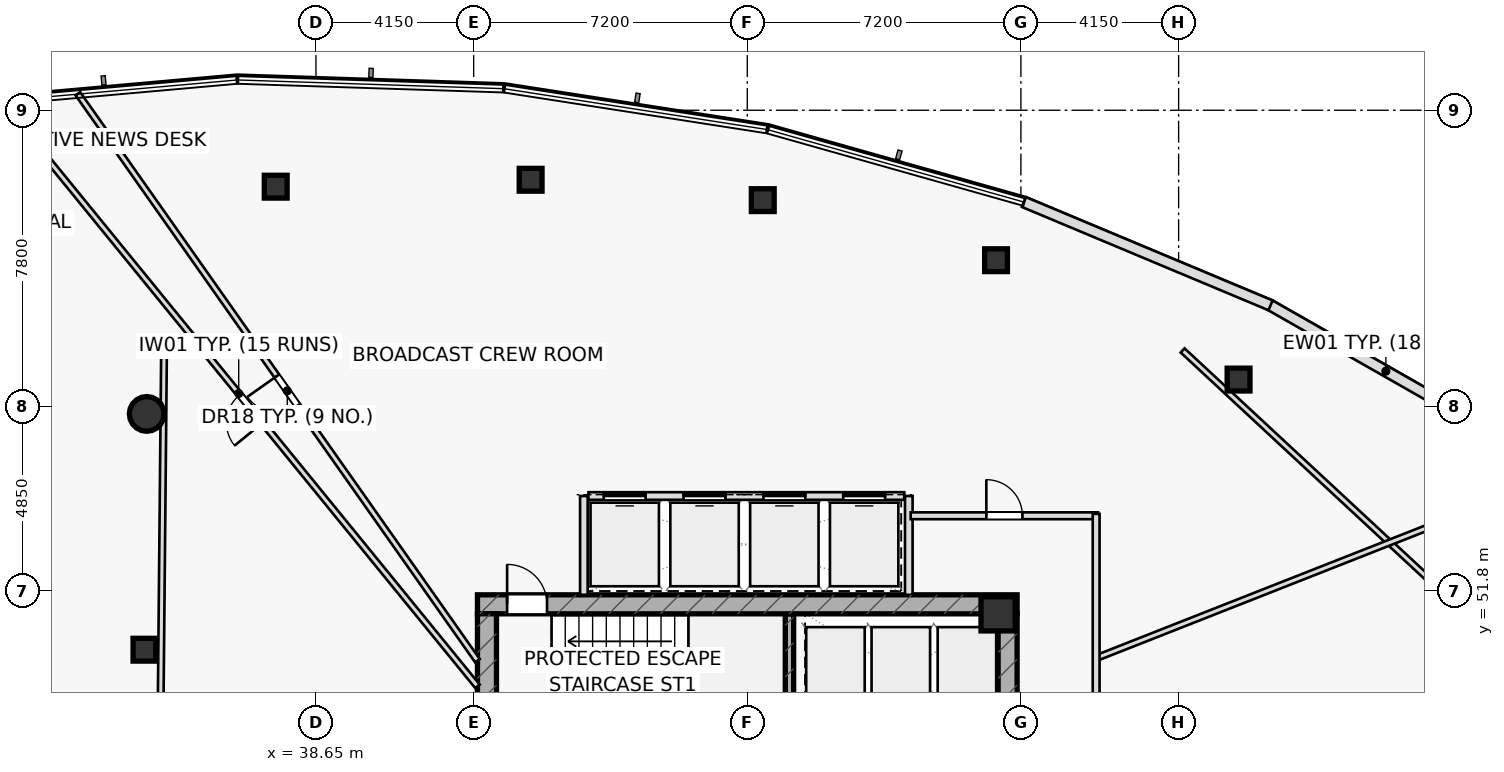
"""IFC4 building model, lengths in metres.
Left out: names, types, materials, properties, quantities, classifications, styles, units other than length and angle.
Written with IfcOpenShell. Run it as: python <this file> out.ifc"""

import sys

from ifc_helpers import new_model, si_unit, direction, frame, frame_2d, origin, origin_2d, place, context, subcontext, project, spatial, rectangle, hollow_rectangle, hollow_circle, extrude, element, fill, save


model = new_model("IFC4")
c1 = context("Model", 3, precision=1e-05, world=origin(), true_north=direction((0.0, 1.0)))
c2 = subcontext(c1, "Body", "Model", "MODEL_VIEW")
j1 = project(units=[si_unit("LENGTHUNIT", "METRE"), si_unit("PLANEANGLEUNIT", "RADIAN")], contexts=[c1])
p1 = place(None, origin())
s1 = spatial("IfcSite", under=j1, at=p1, CompositionType="ELEMENT")
p2 = place(p1, origin())
s2 = spatial("IfcBuilding", under=s1, at=p2, CompositionType="ELEMENT")
p3 = place(p2, frame((0.0, 0.0, 241.9)))
s3 = spatial("IfcBuildingStorey", under=s2, at=p3, CompositionType="ELEMENT", Elevation=241.9)
p4 = place(p3, frame((51.11, 48.1, 0.0), z_axis=(0.0, 0.0, 1.0), x_axis=(0.0, 1.0, 0.0)))
e1 = element("IfcWall", 1, at=p4, inside=s3, PredefinedType="SHEAR", context=c2, shape_type="SweptSolid", body=[
    extrude(rectangle(XDim=3.1, YDim=0.22, at=frame_2d((1.55, 0.0))), origin(), (0.0, 0.0, 1.0), 3.65),
])
p5 = place(p3, frame((42.9, 51.45, 0.0), z_axis=(0.0, 0.0, 1.0), x_axis=(1.0, 0.0, 0.0)))
e2 = element("IfcWall", 2, at=p5, inside=s3, PredefinedType="SHEAR", context=c2, shape_type="SweptSolid", body=[
    extrude(rectangle(XDim=14.2, YDim=0.5, at=frame_2d((7.1, 0.0))), origin(), (0.0, 0.0, 1.0), 3.65),
])
p6 = place(p5, frame((0.78, 0.0, 0.0)))
e3 = element("IfcOpeningElement", 3, at=p6, cuts=e2, PredefinedType="OPENING", context=c2, shape_type="SweptSolid", body=[
    extrude(rectangle(XDim=1.05, YDim=2.2, at=frame_2d((0.525, 1.1))), frame((0.0, 0.26, 0.0), z_axis=(0.0, -1.0, 0.0), x_axis=(1.0, 0.0, 0.0)), (0.0, 0.0, 1.0), 0.52),
])
p7 = place(p3, frame((43.15, 38.8, 0.0), z_axis=(0.0, 0.0, 1.0), x_axis=(0.0, 1.0, 0.0)))
e4 = element("IfcWall", 4, at=p7, inside=s3, PredefinedType="SHEAR", context=c2, shape_type="SweptSolid", body=[
    extrude(rectangle(XDim=12.4, YDim=0.5, at=frame_2d((6.2, 0.0))), origin(), (0.0, 0.0, 1.0), 3.65),
])
p8 = place(p3, frame((56.85, 38.8, 0.0), z_axis=(0.0, 0.0, 1.0), x_axis=(0.0, 1.0, 0.0)))
e5 = element("IfcWall", 5, at=p8, inside=s3, PredefinedType="SHEAR", context=c2, shape_type="SweptSolid", body=[
    extrude(rectangle(XDim=12.4, YDim=0.5, at=frame_2d((6.2, 0.0))), origin(), (0.0, 0.0, 1.0), 3.65),
])
p9 = place(p8, frame((3.85, 0.0, 0.0)))
e6 = element("IfcOpeningElement", 6, at=p9, cuts=e5, PredefinedType="OPENING", context=c2, shape_type="SweptSolid", body=[
    extrude(rectangle(XDim=1.5, YDim=2.2, at=frame_2d((0.75, 1.1))), frame((0.0, 0.26, 0.0), z_axis=(0.0, -1.0, 0.0), x_axis=(1.0, 0.0, 0.0)), (0.0, 0.0, 1.0), 0.52),
])
p10 = place(p3, frame((56.6, 51.2, 0.0), z_axis=(0.0, 0.0, 1.0), x_axis=(1.0, 0.0, 0.0)))
e7 = element("IfcColumn", 7, at=p10, inside=s3, PredefinedType="COLUMN", context=c2, shape_type="SweptSolid", body=[
    extrude(rectangle(XDim=0.9, YDim=0.9, at=origin_2d()), origin(), (0.0, 0.0, 1.0), 3.65),
])
p11 = place(p3, frame((34.196, 56.46, 0.0), z_axis=(0.0, 0.0, 1.0), x_axis=(1.0, 0.0, 0.0)))
e8 = element("IfcColumn", 8, at=p11, inside=s3, PredefinedType="COLUMN", context=c2, shape_type="SweptSolid", body=[
    extrude(hollow_circle(Radius=0.457, WallThickness=0.04, at=origin_2d()), origin(), (0.0, 0.0, 1.0), 3.65),
])
for number, where, z_axis, x_axis in (
    (9, (34.137, 50.256, 0.0), (0.0, 0.0, 1.0), (1.0, 0.0, 0.0)),
    (10, (62.927, 57.364, 0.0), (0.0, 0.0, 1.0), (1.0, 0.0, 0.0)),
    (11, (56.546, 60.504, 0.0), (0.0, 0.0, 1.0), (1.0, 0.0, 0.0)),
    (12, (50.407, 62.085, 0.0), (0.0, 0.0, 1.0), (1.0, 0.0, 0.0)),
    (13, (44.299, 62.621, 0.0), (0.0, 0.0, 1.0), (1.0, 0.0, 0.0)),
    (14, (37.591, 62.439, 0.0), (0.0, 0.0, 1.0), (1.0, 0.0, 0.0)),
):
    element("IfcColumn", number, at=place(p3, frame(where, z_axis=z_axis, x_axis=x_axis)), inside=s3, PredefinedType="COLUMN", context=c2, shape_type="SweptSolid", body=[
        extrude(hollow_rectangle(XDim=0.6, YDim=0.6, WallThickness=0.036, at=origin_2d()), origin(), (0.0, 0.0, 1.0), 3.65),
    ])
for number, where, z_axis, x_axis in (
    (15, (45.7, 51.7, 0.0), (0.0, 0.0, 1.0), (0.0, 1.0, 0.0)),
    (16, (54.25, 51.7, 0.0), (0.0, 0.0, 1.0), (0.0, 1.0, 0.0)),
):
    element("IfcWall", number, at=place(p3, frame(where, z_axis=z_axis, x_axis=x_axis)), inside=s3, PredefinedType="PARTITIONING", context=c2, shape_type="SweptSolid", body=[
        extrude(rectangle(XDim=2.6, YDim=0.2, at=frame_2d((1.3, 0.0))), origin(), (0.0, 0.0, 1.0), 3.65),
    ])
p12 = place(p3, frame((34.652, 58.056, 0.0), z_axis=(0.0, 0.0, 1.0), x_axis=(-0.009553538759, -0.999954363907, 0.0)))
e17 = element("IfcWall", 17, at=p12, inside=s3, PredefinedType="PARTITIONING", context=c2, shape_type="SweptSolid", body=[
    extrude(rectangle(XDim=9.404, YDim=0.15, at=frame_2d((4.702, 0.0))), origin(), (0.0, 0.0, 1.0), 3.135),
])
p13 = place(p3, frame((69.792, 50.388, 0.0), z_axis=(0.0, 0.0, 1.0), x_axis=(-0.732769799181, 0.680476613418, 0.0)))
e18 = element("IfcWall", 18, at=p13, inside=s3, PredefinedType="PARTITIONING", context=c2, shape_type="SweptSolid", body=[
    extrude(rectangle(XDim=11.378, YDim=0.15, at=frame_2d((5.689, 0.0))), origin(), (0.0, 0.0, 1.0), 3.025),
])
p14 = place(p3, frame((59.18, 50.034, 0.0), z_axis=(0.0, 0.0, 1.0), x_axis=(0.930423685665, 0.366485695701, 0.0)))
e19 = element("IfcWall", 19, at=p14, inside=s3, PredefinedType="PARTITIONING", context=c2, shape_type="SweptSolid", body=[
    extrude(rectangle(XDim=13.032, YDim=0.15, at=frame_2d((6.516, 0.0))), origin(), (0.0, 0.0, 1.0), 3.025),
])
p15 = place(p3, frame((42.9, 49.966, 0.0), z_axis=(0.0, 0.0, 1.0), x_axis=(-0.576088019717, 0.817387664171, 0.0)))
e20 = element("IfcWall", 20, at=p15, inside=s3, PredefinedType="PARTITIONING", context=c2, shape_type="SweptSolid", body=[
    extrude(rectangle(XDim=18.251, YDim=0.15, at=frame_2d((9.126, 0.0))), origin(), (0.0, 0.0, 1.0), 3.025),
])
p16 = place(p15, frame((8.213, 0.0, 0.0)))
e21 = element("IfcOpeningElement", 21, at=p16, cuts=e20, PredefinedType="OPENING", context=c2, shape_type="SweptSolid", body=[
    extrude(rectangle(XDim=0.95, YDim=2.05, at=frame_2d((0.475, 1.025))), frame((0.0, 0.085, 0.0), z_axis=(0.0, -1.0, 0.0), x_axis=(1.0, 0.0, 0.0)), (0.0, 0.0, 1.0), 0.17),
])
p17 = place(p3, frame((42.9, 49.292, 0.0), z_axis=(0.0, 0.0, 1.0), x_axis=(-0.63196588554, 0.774996206128, 0.0)))
e22 = element("IfcWall", 22, at=p17, inside=s3, PredefinedType="PARTITIONING", context=c2, shape_type="SweptSolid", body=[
    extrude(rectangle(XDim=19.884, YDim=0.15, at=frame_2d((9.942, 0.0))), origin(), (0.0, 0.0, 1.0), 3.025),
])
p18 = place(p17, frame((8.948, 0.0, 0.0)))
e23 = element("IfcOpeningElement", 23, at=p18, cuts=e22, PredefinedType="OPENING", context=c2, shape_type="SweptSolid", body=[
    extrude(rectangle(XDim=0.95, YDim=2.05, at=frame_2d((0.475, 1.025))), frame((0.0, 0.085, 0.0), z_axis=(0.0, -1.0, 0.0), x_axis=(1.0, 0.0, 0.0)), (0.0, 0.0, 1.0), 0.17),
])
p19 = place(p3, frame((54.3, 53.78, 0.0), z_axis=(0.0, 0.0, 1.0), x_axis=(1.0, 0.0, 0.0)))
e24 = element("IfcWall", 24, at=p19, inside=s3, PredefinedType="PARTITIONING", context=c2, shape_type="SweptSolid", body=[
    extrude(rectangle(XDim=4.93, YDim=0.18, at=frame_2d((2.465, 0.0))), origin(), (0.0, 0.0, 1.0), 3.65),
])
p20 = place(p19, frame((1.99, 0.0, 0.0)))
e25 = element("IfcOpeningElement", 25, at=p20, cuts=e24, PredefinedType="OPENING", context=c2, shape_type="SweptSolid", body=[
    extrude(rectangle(XDim=0.95, YDim=2.05, at=frame_2d((0.475, 1.025))), frame((0.0, 0.1, 0.0), z_axis=(0.0, -1.0, 0.0), x_axis=(1.0, 0.0, 0.0)), (0.0, 0.0, 1.0), 0.2),
])
p21 = place(p3, frame((59.18, 53.83, 0.0), z_axis=(0.0, 0.0, 1.0), x_axis=(0.0, -1.0, 0.0)))
e26 = element("IfcWall", 26, at=p21, inside=s3, PredefinedType="PARTITIONING", context=c2, shape_type="SweptSolid", body=[
    extrude(rectangle(XDim=5.53, YDim=0.18, at=frame_2d((2.765, 0.0))), origin(), (0.0, 0.0, 1.0), 3.65),
])
p22 = place(p3, frame((69.866, 55.84, 0.0), z_axis=(0.0, 0.0, 1.0), x_axis=(-0.868841491728, 0.495090357663, 0.0)))
e27 = element("IfcWall", 27, at=p22, inside=s3, PredefinedType="STANDARD", context=c2, shape_type="SweptSolid", body=[
    extrude(rectangle(XDim=7.048, YDim=0.28, at=frame_2d((3.524, 0.0))), origin(), (0.0, 0.0, 1.0), 3.65),
])
p23 = place(p3, frame((63.769, 59.317, 0.0), z_axis=(0.0, 0.0, 1.0), x_axis=(-0.922358763761, 0.386334454733, 0.0)))
e28 = element("IfcWall", 28, at=p23, inside=s3, PredefinedType="STANDARD", context=c2, shape_type="SweptSolid", body=[
    extrude(rectangle(XDim=7.036, YDim=0.28, at=frame_2d((3.518, 0.0))), origin(), (0.0, 0.0, 1.0), 3.65),
])
p24 = place(p3, frame((45.82, 54.3, 0.0), z_axis=(0.0, 0.0, 1.0), x_axis=(1.0, 0.0, 0.0)))
e29 = element("IfcWall", 29, at=p24, inside=s3, PredefinedType="PARTITIONING", context=c2, shape_type="SweptSolid", body=[
    extrude(rectangle(XDim=8.31, YDim=0.2, at=frame_2d((4.155, 0.0))), origin(), (0.0, 0.0, 1.0), 3.65),
])
p25 = place(p24, frame((0.405, 0.0, 0.0)))
e30 = element("IfcOpeningElement", 30, at=p25, cuts=e29, PredefinedType="OPENING", context=c2, shape_type="SweptSolid", body=[
    extrude(rectangle(XDim=1.1, YDim=2.15, at=frame_2d((0.55, 1.075))), frame((0.0, 0.11, 0.0), z_axis=(0.0, -1.0, 0.0), x_axis=(1.0, 0.0, 0.0)), (0.0, 0.0, 1.0), 0.22),
])
p26 = place(p24, frame((2.505, 0.0, 0.0)))
e31 = element("IfcOpeningElement", 31, at=p26, cuts=e29, PredefinedType="OPENING", context=c2, shape_type="SweptSolid", body=[
    extrude(rectangle(XDim=1.1, YDim=2.15, at=frame_2d((0.55, 1.075))), frame((0.0, 0.11, 0.0), z_axis=(0.0, -1.0, 0.0), x_axis=(1.0, 0.0, 0.0)), (0.0, 0.0, 1.0), 0.22),
])
p27 = place(p24, frame((4.605, 0.0, 0.0)))
e32 = element("IfcOpeningElement", 32, at=p27, cuts=e29, PredefinedType="OPENING", context=c2, shape_type="SweptSolid", body=[
    extrude(rectangle(XDim=1.1, YDim=2.15, at=frame_2d((0.55, 1.075))), frame((0.0, 0.11, 0.0), z_axis=(0.0, -1.0, 0.0), x_axis=(1.0, 0.0, 0.0)), (0.0, 0.0, 1.0), 0.22),
])
p28 = place(p24, frame((6.705, 0.0, 0.0)))
e33 = element("IfcOpeningElement", 33, at=p28, cuts=e29, PredefinedType="OPENING", context=c2, shape_type="SweptSolid", body=[
    extrude(rectangle(XDim=1.1, YDim=2.15, at=frame_2d((0.55, 1.075))), frame((0.0, 0.11, 0.0), z_axis=(0.0, -1.0, 0.0), x_axis=(1.0, 0.0, 0.0)), (0.0, 0.0, 1.0), 0.22),
])
p29 = place(p6, origin())
e34 = element("IfcDoor", 34, at=p29, inside=s3, OperationType="SINGLE_SWING_LEFT", PredefinedType="DOOR", context=c2, shape_type="SweptSolid", body=[
    extrude(rectangle(XDim=1.05, YDim=2.2, at=frame_2d((0.525, 1.1))), frame((0.0, 0.025, 0.0), z_axis=(0.0, -1.0, 0.0), x_axis=(1.0, 0.0, 0.0)), (0.0, 0.0, 1.0), 0.05),
])
fill(e3, e34)
p30 = place(p16, origin())
e35 = element("IfcDoor", 35, at=p30, inside=s3, OperationType="SINGLE_SWING_RIGHT", PredefinedType="DOOR", context=c2, shape_type="SweptSolid", body=[
    extrude(rectangle(XDim=0.95, YDim=2.05, at=frame_2d((0.475, 1.025))), frame((0.0, 0.025, 0.0), z_axis=(0.0, -1.0, 0.0), x_axis=(1.0, 0.0, 0.0)), (0.0, 0.0, 1.0), 0.05),
])
fill(e21, e35)
p31 = place(p18, origin())
e36 = element("IfcDoor", 36, at=p31, inside=s3, OperationType="SINGLE_SWING_LEFT", PredefinedType="DOOR", context=c2, shape_type="SweptSolid", body=[
    extrude(rectangle(XDim=0.95, YDim=2.05, at=frame_2d((0.475, 1.025))), frame((0.0, 0.025, 0.0), z_axis=(0.0, -1.0, 0.0), x_axis=(1.0, 0.0, 0.0)), (0.0, 0.0, 1.0), 0.05),
])
fill(e23, e36)
p32 = place(p20, origin())
e37 = element("IfcDoor", 37, at=p32, inside=s3, OperationType="SINGLE_SWING_LEFT", PredefinedType="DOOR", context=c2, shape_type="SweptSolid", body=[
    extrude(rectangle(XDim=0.95, YDim=2.05, at=frame_2d((0.475, 1.025))), frame((0.0, 0.025, 0.0), z_axis=(0.0, -1.0, 0.0), x_axis=(1.0, 0.0, 0.0)), (0.0, 0.0, 1.0), 0.05),
])
fill(e25, e37)
p33 = place(p25, origin())
e38 = element("IfcDoor", 38, at=p33, inside=s3, OperationType="SLIDING_TO_LEFT", PredefinedType="DOOR", context=c2, shape_type="SweptSolid", body=[
    extrude(rectangle(XDim=1.1, YDim=2.15, at=frame_2d((0.55, 1.075))), frame((0.0, 0.025, 0.0), z_axis=(0.0, -1.0, 0.0), x_axis=(1.0, 0.0, 0.0)), (0.0, 0.0, 1.0), 0.05),
])
fill(e30, e38)
p34 = place(p26, origin())
e39 = element("IfcDoor", 39, at=p34, inside=s3, OperationType="SLIDING_TO_RIGHT", PredefinedType="DOOR", context=c2, shape_type="SweptSolid", body=[
    extrude(rectangle(XDim=1.1, YDim=2.15, at=frame_2d((0.55, 1.075))), frame((0.0, 0.025, 0.0), z_axis=(0.0, -1.0, 0.0), x_axis=(1.0, 0.0, 0.0)), (0.0, 0.0, 1.0), 0.05),
])
fill(e31, e39)
p35 = place(p27, origin())
e40 = element("IfcDoor", 40, at=p35, inside=s3, OperationType="SLIDING_TO_LEFT", PredefinedType="DOOR", context=c2, shape_type="SweptSolid", body=[
    extrude(rectangle(XDim=1.1, YDim=2.15, at=frame_2d((0.55, 1.075))), frame((0.0, 0.025, 0.0), z_axis=(0.0, -1.0, 0.0), x_axis=(1.0, 0.0, 0.0)), (0.0, 0.0, 1.0), 0.05),
])
fill(e32, e40)
p36 = place(p28, origin())
e41 = element("IfcDoor", 41, at=p36, inside=s3, OperationType="SLIDING_TO_RIGHT", PredefinedType="DOOR", context=c2, shape_type="SweptSolid", body=[
    extrude(rectangle(XDim=1.1, YDim=2.15, at=frame_2d((0.55, 1.075))), frame((0.0, 0.025, 0.0), z_axis=(0.0, -1.0, 0.0), x_axis=(1.0, 0.0, 0.0)), (0.0, 0.0, 1.0), 0.05),
])
fill(e33, e41)
save(model, sys.argv[1])
